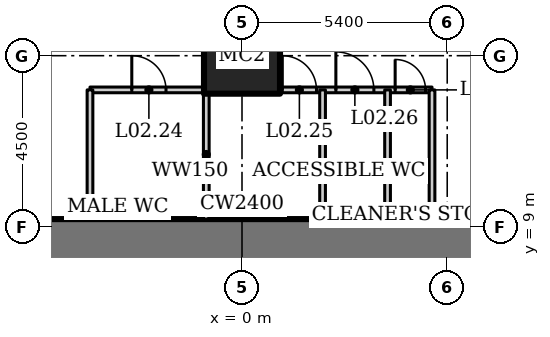
"""IFC4 building model, lengths in metres.
Left out: names, types, materials, properties, quantities, classifications, styles, units other than length and angle.
Written with IfcOpenShell. Run it as: python <this file> out.ifc"""

import sys

from ifc_helpers import new_model, si_unit, direction, frame, frame_2d, origin, origin_2d, place, context, subcontext, project, spatial, rectangle, hollow_rectangle, extrude, element, fill, save


model = new_model("IFC4")
c1 = context("Model", 3, precision=1e-05, world=origin(), true_north=direction((0.0, 1.0)))
c2 = subcontext(c1, "Body", "Model", "MODEL_VIEW")
j1 = project(units=[si_unit("LENGTHUNIT", "METRE"), si_unit("PLANEANGLEUNIT", "RADIAN")], contexts=[c1])
p1 = place(None, origin())
s1 = spatial("IfcSite", under=j1, at=p1, CompositionType="ELEMENT")
p2 = place(p1, origin())
s2 = spatial("IfcBuilding", under=s1, at=p2, CompositionType="ELEMENT")
p3 = place(p2, frame((0.0, 0.0, 14.5)))
s3 = spatial("IfcBuildingStorey", under=s2, at=p3, CompositionType="ELEMENT", Elevation=14.5)
p4 = place(p3, frame((0.0, 13.5, 0.0), z_axis=(0.0, 0.0, 1.0), x_axis=(1.0, 0.0, 0.0)))
e1 = element("IfcColumn", 1, at=p4, inside=s3, PredefinedType="COLUMN", context=c2, shape_type="SweptSolid", body=[
    extrude(hollow_rectangle(XDim=2.0, YDim=2.0, WallThickness=0.17, at=origin_2d()), origin(), (0.0, 0.0, 1.0), 7.5),
])
p5 = place(p3, frame((12.2, 8.0, 0.0), z_axis=(0.0, 0.0, 1.0), x_axis=(-1.0, 0.0, 0.0)))
e2 = element("IfcWall", 2, at=p5, inside=s3, PredefinedType="SHEAR", context=c2, shape_type="SweptSolid", body=[
    extrude(rectangle(XDim=24.4, YDim=2.4, at=frame_2d((12.2, 0.0))), origin(), (0.0, 0.0, 1.0), 7.5),
])
p6 = place(p3, frame((-4.0, 12.6, 0.0), z_axis=(0.0, 0.0, 1.0), x_axis=(1.0, 0.0, 0.0)))
e3 = element("IfcWall", 3, at=p6, inside=s3, PredefinedType="SOLIDWALL", context=c2, shape_type="SweptSolid", body=[
    extrude(rectangle(XDim=9.0, YDim=0.15, at=frame_2d((4.5, 0.0))), origin(), (0.0, 0.0, 1.0), 7.3),
])
p7 = place(p6, frame((1.1, 0.0, 0.0)))
e4 = element("IfcOpeningElement", 4, at=p7, cuts=e3, PredefinedType="OPENING", context=c2, shape_type="SweptSolid", body=[
    extrude(rectangle(XDim=0.9, YDim=2.1, at=frame_2d((0.45, 1.05))), frame((0.0, 0.085, 0.0), z_axis=(0.0, -1.0, 0.0), x_axis=(1.0, 0.0, 0.0)), (0.0, 0.0, 1.0), 0.17),
])
p8 = place(p6, frame((5.06, 0.0, 0.0)))
e5 = element("IfcOpeningElement", 5, at=p8, cuts=e3, PredefinedType="OPENING", context=c2, shape_type="SweptSolid", body=[
    extrude(rectangle(XDim=0.9, YDim=2.1, at=frame_2d((0.45, 1.05))), frame((0.0, 0.085, 0.0), z_axis=(0.0, -1.0, 0.0), x_axis=(1.0, 0.0, 0.0)), (0.0, 0.0, 1.0), 0.17),
])
p9 = place(p6, frame((6.47, 0.0, 0.0)))
e6 = element("IfcOpeningElement", 6, at=p9, cuts=e3, PredefinedType="OPENING", context=c2, shape_type="SweptSolid", body=[
    extrude(rectangle(XDim=1.0, YDim=2.1, at=frame_2d((0.5, 1.05))), frame((0.0, 0.085, 0.0), z_axis=(0.0, -1.0, 0.0), x_axis=(1.0, 0.0, 0.0)), (0.0, 0.0, 1.0), 0.17),
])
p10 = place(p6, frame((8.03, 0.0, 0.0)))
e7 = element("IfcOpeningElement", 7, at=p10, cuts=e3, PredefinedType="OPENING", context=c2, shape_type="SweptSolid", body=[
    extrude(rectangle(XDim=0.8, YDim=2.1, at=frame_2d((0.4, 1.05))), frame((0.0, 0.085, 0.0), z_axis=(0.0, -1.0, 0.0), x_axis=(1.0, 0.0, 0.0)), (0.0, 0.0, 1.0), 0.17),
])
for number, where, z_axis, x_axis in (
    (8, (-4.0, 9.2, 0.0), (0.0, 0.0, 1.0), (0.0, 1.0, 0.0)),
    (9, (5.0, 9.2, 0.0), (0.0, 0.0, 1.0), (0.0, 1.0, 0.0)),
    (10, (-0.94, 9.2, 0.0), (0.0, 0.0, 1.0), (0.0, 1.0, 0.0)),
):
    element("IfcWall", number, at=place(p3, frame(where, z_axis=z_axis, x_axis=x_axis)), inside=s3, PredefinedType="SOLIDWALL", context=c2, shape_type="SweptSolid", body=[
        extrude(rectangle(XDim=3.4, YDim=0.15, at=frame_2d((1.7, 0.0))), origin(), (0.0, 0.0, 1.0), 7.3),
    ])
p11 = place(p3, frame((2.12, 9.2, 0.0), z_axis=(0.0, 0.0, 1.0), x_axis=(0.0, 1.0, 0.0)))
e11 = element("IfcWall", 11, at=p11, inside=s3, PredefinedType="SOLIDWALL", context=c2, shape_type="SweptSolid", body=[
    extrude(rectangle(XDim=3.4, YDim=0.15, at=frame_2d((1.7, 0.0))), origin(), (0.0, 0.0, 1.0), 5.8),
])
p12 = place(p3, frame((3.83, 9.2, 0.0), z_axis=(0.0, 0.0, 1.0), x_axis=(0.0, 1.0, 0.0)))
e12 = element("IfcWall", 12, at=p12, inside=s3, PredefinedType="SOLIDWALL", context=c2, shape_type="SweptSolid", body=[
    extrude(rectangle(XDim=3.4, YDim=0.15, at=frame_2d((1.7, 0.0))), origin(), (0.0, 0.0, 1.0), 7.3),
])
p13 = place(p7, origin())
e13 = element("IfcDoor", 13, at=p13, inside=s3, OperationType="SINGLE_SWING_LEFT", PredefinedType="DOOR", context=c2, shape_type="SweptSolid", body=[
    extrude(rectangle(XDim=0.9, YDim=2.1, at=frame_2d((0.45, 1.05))), frame((0.0, 0.025, 0.0), z_axis=(0.0, -1.0, 0.0), x_axis=(1.0, 0.0, 0.0)), (0.0, 0.0, 1.0), 0.05),
])
fill(e4, e13)
p14 = place(p8, origin())
e14 = element("IfcDoor", 14, at=p14, inside=s3, OperationType="SINGLE_SWING_LEFT", PredefinedType="DOOR", context=c2, shape_type="SweptSolid", body=[
    extrude(rectangle(XDim=0.9, YDim=2.1, at=frame_2d((0.45, 1.05))), frame((0.0, 0.025, 0.0), z_axis=(0.0, -1.0, 0.0), x_axis=(1.0, 0.0, 0.0)), (0.0, 0.0, 1.0), 0.05),
])
fill(e5, e14)
p15 = place(p9, origin())
e15 = element("IfcDoor", 15, at=p15, inside=s3, OperationType="SINGLE_SWING_LEFT", PredefinedType="DOOR", context=c2, shape_type="SweptSolid", body=[
    extrude(rectangle(XDim=1.0, YDim=2.1, at=frame_2d((0.5, 1.05))), frame((0.0, 0.025, 0.0), z_axis=(0.0, -1.0, 0.0), x_axis=(1.0, 0.0, 0.0)), (0.0, 0.0, 1.0), 0.05),
])
fill(e6, e15)
p16 = place(p10, origin())
e16 = element("IfcDoor", 16, at=p16, inside=s3, OperationType="SINGLE_SWING_LEFT", PredefinedType="DOOR", context=c2, shape_type="SweptSolid", body=[
    extrude(rectangle(XDim=0.8, YDim=2.1, at=frame_2d((0.4, 1.05))), frame((0.0, 0.025, 0.0), z_axis=(0.0, -1.0, 0.0), x_axis=(1.0, 0.0, 0.0)), (0.0, 0.0, 1.0), 0.05),
])
fill(e7, e16)
save(model, sys.argv[1])
